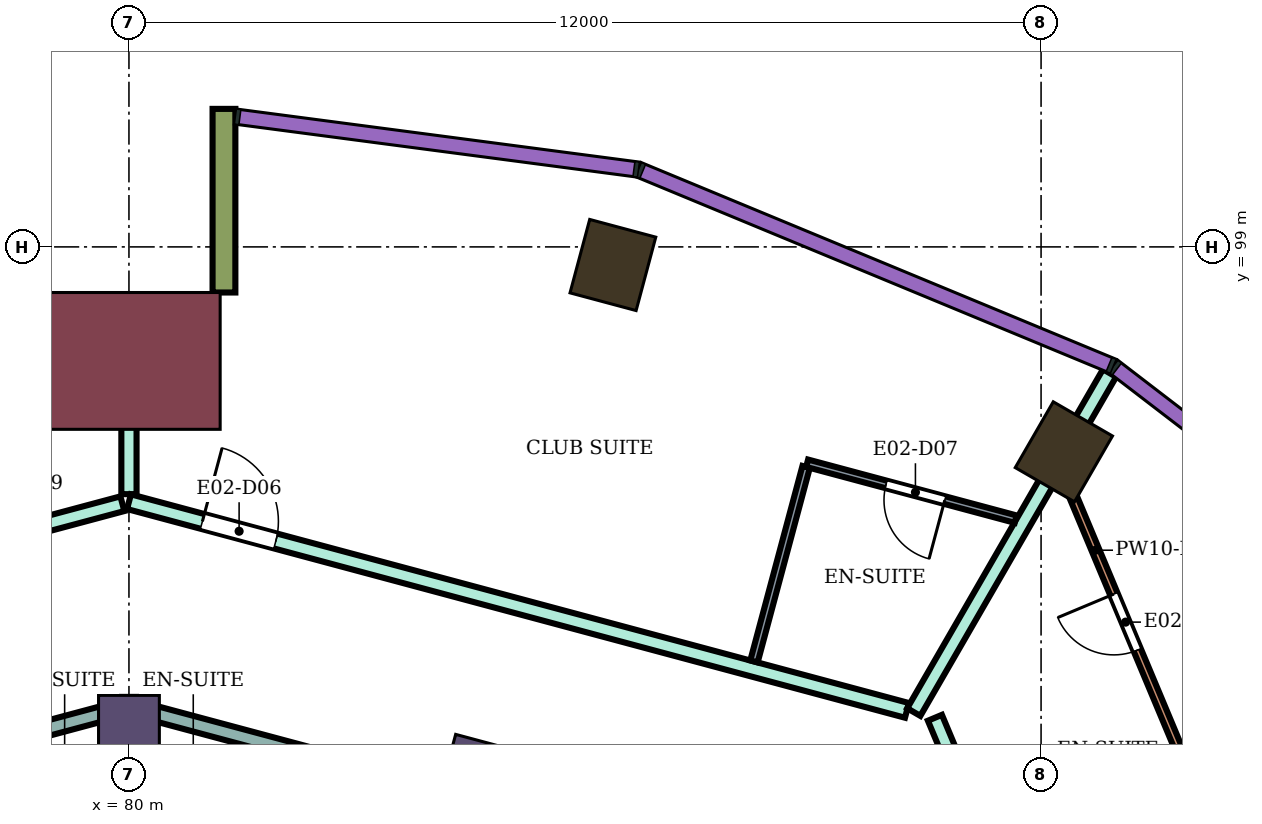
"""IFC4 building model, lengths in metres.
Left out: names, types, materials, properties, quantities, classifications, styles, units other than length and angle.
Written with IfcOpenShell. Run it as: python <this file> out.ifc"""

import sys

from ifc_helpers import new_model, si_unit, direction, frame, frame_2d, origin, origin_2d, place, context, subcontext, project, spatial, rectangle, extrude, element, fill, save


model = new_model("IFC4")
c1 = context("Model", 3, precision=1e-05, world=origin(), true_north=direction((0.0, 1.0)))
c2 = subcontext(c1, "Body", "Model", "MODEL_VIEW")
j1 = project(units=[si_unit("LENGTHUNIT", "METRE"), si_unit("PLANEANGLEUNIT", "RADIAN")], contexts=[c1])
p1 = place(None, origin())
s1 = spatial("IfcSite", under=j1, at=p1, CompositionType="ELEMENT")
p2 = place(p1, origin())
s2 = spatial("IfcBuilding", under=s1, at=p2, CompositionType="ELEMENT")
p3 = place(p2, frame((0.0, 0.0, 134.1)))
s3 = spatial("IfcBuildingStorey", under=s2, at=p3, CompositionType="ELEMENT", Elevation=134.1)
for number, where, z_axis, x_axis in (
    (1, (92.3, 96.304, 0.0), (0.0, 0.0, 1.0), (0.5, 0.866, 0.0)),
    (2, (86.367, 98.762, 0.0), (0.0, 0.0, 1.0), (0.259, 0.966, 0.0)),
):
    element("IfcColumn", number, at=place(p3, frame(where, z_axis=z_axis, x_axis=x_axis)), inside=s3, PredefinedType="COLUMN", context=c2, shape_type="SweptSolid", body=[
        extrude(rectangle(XDim=1.0, YDim=0.9, at=origin_2d()), origin(), (0.0, 0.0, 1.0), 3.9),
    ])
for number, where, z_axis, x_axis in (
    (3, (84.555, 92.0, 0.0), (0.0, 0.0, 1.0), (0.259, 0.966, 0.0)),
    (4, (80.0, 92.6, 0.0), (0.0, 0.0, 1.0), (0.0, 1.0, 0.0)),
):
    element("IfcColumn", number, at=place(p3, frame(where, z_axis=z_axis, x_axis=x_axis)), inside=s3, PredefinedType="COLUMN", context=c2, shape_type="SweptSolid", body=[
        extrude(rectangle(XDim=1.0, YDim=0.8, at=origin_2d()), origin(), (0.0, 0.0, 1.0), 3.9),
    ])
p4 = place(p3, frame((80.0, 97.5, 0.0), z_axis=(0.0, 0.0, 1.0), x_axis=(0.0, 1.0, 0.0)))
e5 = element("IfcColumn", 5, at=p4, inside=s3, PredefinedType="COLUMN", context=c2, shape_type="SweptSolid", body=[
    extrude(rectangle(XDim=1.8, YDim=2.4, at=origin_2d()), origin(), (0.0, 0.0, 1.0), 3.9),
])
p5 = place(p3, frame((81.25, 98.4, 0.0), z_axis=(0.0, 0.0, 1.0), x_axis=(0.0, 1.0, 0.0)))
e6 = element("IfcWall", 6, at=p5, inside=s3, PredefinedType="NOTDEFINED", context=c2, shape_type="SweptSolid", body=[
    extrude(rectangle(XDim=2.416, YDim=0.3, at=frame_2d((1.208, 0.0))), origin(), (0.0, 0.0, 1.0), 3.9),
])
p6 = place(p3, frame((69.397, 92.805, 0.0), z_axis=(0.0, 0.0, 1.0), x_axis=(0.965971666602, 0.258647906087, 0.0)))
e7 = element("IfcWall", 7, at=p6, inside=s3, PredefinedType="PARTITIONING", context=c2, shape_type="SweptSolid", body=[
    extrude(rectangle(XDim=10.887, YDim=0.2, at=frame_2d((5.443, 0.0))), origin(), (0.0, 0.0, 1.0), 3.45),
])
p7 = place(p6, frame((6.163, 0.0, 0.0)))
e8 = element("IfcOpeningElement", 8, at=p7, cuts=e7, PredefinedType="OPENING", context=c2, shape_type="SweptSolid", body=[
    extrude(rectangle(XDim=1.0, YDim=2.1, at=frame_2d((0.5, 1.05))), frame((0.0, 0.11, 0.0), z_axis=(0.0, -1.0, 0.0), x_axis=(1.0, 0.0, 0.0)), (0.0, 0.0, 1.0), 0.22),
])
p8 = place(p6, frame((2.461, 0.0, 0.0)))
e9 = element("IfcOpeningElement", 9, at=p8, cuts=e7, PredefinedType="OPENING", context=c2, shape_type="SweptSolid", body=[
    extrude(rectangle(XDim=1.0, YDim=2.1, at=frame_2d((0.5, 1.05))), frame((0.0, 0.11, 0.0), z_axis=(0.0, -1.0, 0.0), x_axis=(1.0, 0.0, 0.0)), (0.0, 0.0, 1.0), 0.22),
])
p9 = place(p3, frame((71.303, 90.625, 0.0), z_axis=(0.0, 0.0, 1.0), x_axis=(0.965971868307, 0.258647152776, 0.0)))
e10 = element("IfcWall", 10, at=p9, inside=s3, PredefinedType="PARTITIONING", context=c2, shape_type="SweptSolid", body=[
    extrude(rectangle(XDim=8.874, YDim=0.2, at=frame_2d((4.437, 0.0))), origin(), (0.0, 0.0, 1.0), 3.08),
])
p10 = place(p9, frame((0.55, 0.0, 0.0)))
e11 = element("IfcOpeningElement", 11, at=p10, cuts=e10, PredefinedType="OPENING", context=c2, shape_type="SweptSolid", body=[
    extrude(rectangle(XDim=1.0, YDim=2.1, at=frame_2d((0.5, 1.05))), frame((0.0, 0.11, 0.0), z_axis=(0.0, -1.0, 0.0), x_axis=(1.0, 0.0, 0.0)), (0.0, 0.0, 1.0), 0.22),
])
p11 = place(p3, frame((80.0, 82.699, 0.0), z_axis=(0.0, 0.0, 1.0), x_axis=(0.0, 1.0, 0.0)))
e12 = element("IfcWall", 12, at=p11, inside=s3, PredefinedType="PARTITIONING", context=c2, shape_type="SweptSolid", body=[
    extrude(rectangle(XDim=10.125, YDim=0.2, at=frame_2d((5.062, 0.0))), origin(), (0.0, 0.0, 1.0), 3.45),
])
p12 = place(p3, frame((80.0, 92.954, 0.0), z_axis=(0.0, 0.0, 1.0), x_axis=(0.96592536278, -0.258820774936, 0.0)))
e13 = element("IfcWall", 13, at=p12, inside=s3, PredefinedType="PARTITIONING", context=c2, shape_type="SweptSolid", body=[
    extrude(rectangle(XDim=8.934, YDim=0.2, at=frame_2d((4.467, 0.0))), origin(), (0.0, 0.0, 1.0), 3.08),
])
p13 = place(p12, frame((7.454, 0.0, 0.0)))
e14 = element("IfcOpeningElement", 14, at=p13, cuts=e13, PredefinedType="OPENING", context=c2, shape_type="SweptSolid", body=[
    extrude(rectangle(XDim=1.0, YDim=2.1, at=frame_2d((0.5, 1.05))), frame((0.0, 0.11, 0.0), z_axis=(0.0, -1.0, 0.0), x_axis=(1.0, 0.0, 0.0)), (0.0, 0.0, 1.0), 0.22),
])
p14 = place(p3, frame((80.0, 95.747, 0.0), z_axis=(0.0, 0.0, 1.0), x_axis=(0.0, 1.0, 0.0)))
e15 = element("IfcWall", 15, at=p14, inside=s3, PredefinedType="PARTITIONING", context=c2, shape_type="SweptSolid", body=[
    extrude(rectangle(XDim=2.452, YDim=0.2, at=frame_2d((1.226, 0.0))), origin(), (0.0, 0.0, 1.0), 3.45),
])
p15 = place(p3, frame((80.0, 95.648, 0.0), z_axis=(0.0, 0.0, 1.0), x_axis=(0.965852259202, -0.259093445292, 0.0)))
e16 = element("IfcWall", 16, at=p15, inside=s3, PredefinedType="PARTITIONING", context=c2, shape_type="SweptSolid", body=[
    extrude(rectangle(XDim=10.597, YDim=0.2, at=frame_2d((5.298, 0.0))), origin(), (0.0, 0.0, 1.0), 3.45),
])
p16 = place(p15, frame((1.0, 0.0, 0.0)))
e17 = element("IfcOpeningElement", 17, at=p16, cuts=e16, PredefinedType="OPENING", context=c2, shape_type="SweptSolid", body=[
    extrude(rectangle(XDim=1.0, YDim=2.1, at=frame_2d((0.5, 1.05))), frame((0.0, 0.11, 0.0), z_axis=(0.0, -1.0, 0.0), x_axis=(1.0, 0.0, 0.0)), (0.0, 0.0, 1.0), 0.22),
])
p17 = place(p3, frame((90.325, 92.88, 0.0), z_axis=(0.0, 0.0, 1.0), x_axis=(0.500084891114, 0.865976386329, 0.0)))
e18 = element("IfcWall", 18, at=p17, inside=s3, PredefinedType="PARTITIONING", context=c2, shape_type="SweptSolid", body=[
    extrude(rectangle(XDim=5.15, YDim=0.2, at=frame_2d((2.575, 0.0))), origin(), (0.0, 0.0, 1.0), 3.45),
])
p18 = place(p3, frame((90.604, 92.805, 0.0), z_axis=(0.0, 0.0, 1.0), x_axis=(0.386199042801, -0.922415470024, 0.0)))
e19 = element("IfcWall", 19, at=p18, inside=s3, PredefinedType="PARTITIONING", context=c2, shape_type="SweptSolid", body=[
    extrude(rectangle(XDim=8.48, YDim=0.2, at=frame_2d((4.24, 0.0))), origin(), (0.0, 0.0, 1.0), 3.45),
])
p19 = place(p18, frame((3.823, 0.0, 0.0)))
e20 = element("IfcOpeningElement", 20, at=p19, cuts=e19, PredefinedType="OPENING", context=c2, shape_type="SweptSolid", body=[
    extrude(rectangle(XDim=1.0, YDim=2.1, at=frame_2d((0.5, 1.05))), frame((0.0, 0.11, 0.0), z_axis=(0.0, -1.0, 0.0), x_axis=(1.0, 0.0, 0.0)), (0.0, 0.0, 1.0), 0.22),
])
p20 = place(p3, frame((88.223, 93.547, 0.0), z_axis=(0.0, 0.0, 1.0), x_axis=(0.259021640683, 0.965871518194, 0.0)))
e21 = element("IfcWall", 21, at=p20, inside=s3, PredefinedType="PARTITIONING", context=c2, shape_type="SweptSolid", body=[
    extrude(rectangle(XDim=2.649, YDim=0.1, at=frame_2d((1.325, 0.0))), origin(), (0.0, 0.0, 1.0), 3.45),
])
p21 = place(p3, frame((88.922, 96.154, 0.0), z_axis=(0.0, 0.0, 1.0), x_axis=(0.965887418767, -0.258962341408, 0.0)))
e22 = element("IfcWall", 22, at=p21, inside=s3, PredefinedType="PARTITIONING", context=c2, shape_type="SweptSolid", body=[
    extrude(rectangle(XDim=2.841, YDim=0.1, at=frame_2d((1.42, 0.0))), origin(), (0.0, 0.0, 1.0), 3.45),
])
p22 = place(p21, frame((1.075, 0.0, 0.0)))
e23 = element("IfcOpeningElement", 23, at=p22, cuts=e22, PredefinedType="OPENING", context=c2, shape_type="SweptSolid", body=[
    extrude(rectangle(XDim=0.8, YDim=2.1, at=frame_2d((0.4, 1.05))), frame((0.0, 0.06, 0.0), z_axis=(0.0, -1.0, 0.0), x_axis=(1.0, 0.0, 0.0)), (0.0, 0.0, 1.0), 0.12),
])
p23 = place(p3, frame((92.289, 96.03, 0.0), z_axis=(0.0, 0.0, 1.0), x_axis=(0.386237487323, -0.922399373041, 0.0)))
e24 = element("IfcWall", 24, at=p23, inside=s3, PredefinedType="PARTITIONING", context=c2, shape_type="SweptSolid", body=[
    extrude(rectangle(XDim=4.423, YDim=0.1, at=frame_2d((2.211, 0.0))), origin(), (0.0, 0.0, 1.0), 2.68),
])
p24 = place(p23, frame((1.731, 0.0, 0.0)))
e25 = element("IfcOpeningElement", 25, at=p24, cuts=e24, PredefinedType="OPENING", context=c2, shape_type="SweptSolid", body=[
    extrude(rectangle(XDim=0.8, YDim=2.1, at=frame_2d((0.4, 1.05))), frame((0.0, 0.06, 0.0), z_axis=(0.0, -1.0, 0.0), x_axis=(1.0, 0.0, 0.0)), (0.0, 0.0, 1.0), 0.12),
])
p25 = place(p24, frame((0.8, 0.0, 0.0), z_axis=(0.0, 0.0, 1.0), x_axis=(-1.0, 0.0, 0.0)))
e26 = element("IfcDoor", 26, at=p25, inside=s3, OperationType="SINGLE_SWING_RIGHT", PredefinedType="DOOR", context=c2, shape_type="SweptSolid", body=[
    extrude(rectangle(XDim=0.8, YDim=2.1, at=frame_2d((0.4, 1.05))), frame((0.0, 0.025, 0.0), z_axis=(0.0, -1.0, 0.0), x_axis=(1.0, 0.0, 0.0)), (0.0, 0.0, 1.0), 0.05),
])
fill(e25, e26)
p26 = place(p16, origin())
e27 = element("IfcDoor", 27, at=p26, inside=s3, OperationType="SINGLE_SWING_LEFT", PredefinedType="DOOR", context=c2, shape_type="SweptSolid", body=[
    extrude(rectangle(XDim=1.0, YDim=2.1, at=frame_2d((0.5, 1.05))), frame((0.0, 0.025, 0.0), z_axis=(0.0, -1.0, 0.0), x_axis=(1.0, 0.0, 0.0)), (0.0, 0.0, 1.0), 0.05),
])
fill(e17, e27)
p27 = place(p22, frame((0.8, 0.0, 0.0), z_axis=(0.0, 0.0, 1.0), x_axis=(-1.0, 0.0, 0.0)))
e28 = element("IfcDoor", 28, at=p27, inside=s3, OperationType="SINGLE_SWING_LEFT", PredefinedType="DOOR", context=c2, shape_type="SweptSolid", body=[
    extrude(rectangle(XDim=0.8, YDim=2.1, at=frame_2d((0.4, 1.05))), frame((0.0, 0.025, 0.0), z_axis=(0.0, -1.0, 0.0), x_axis=(1.0, 0.0, 0.0)), (0.0, 0.0, 1.0), 0.05),
])
fill(e23, e28)
save(model, sys.argv[1])
